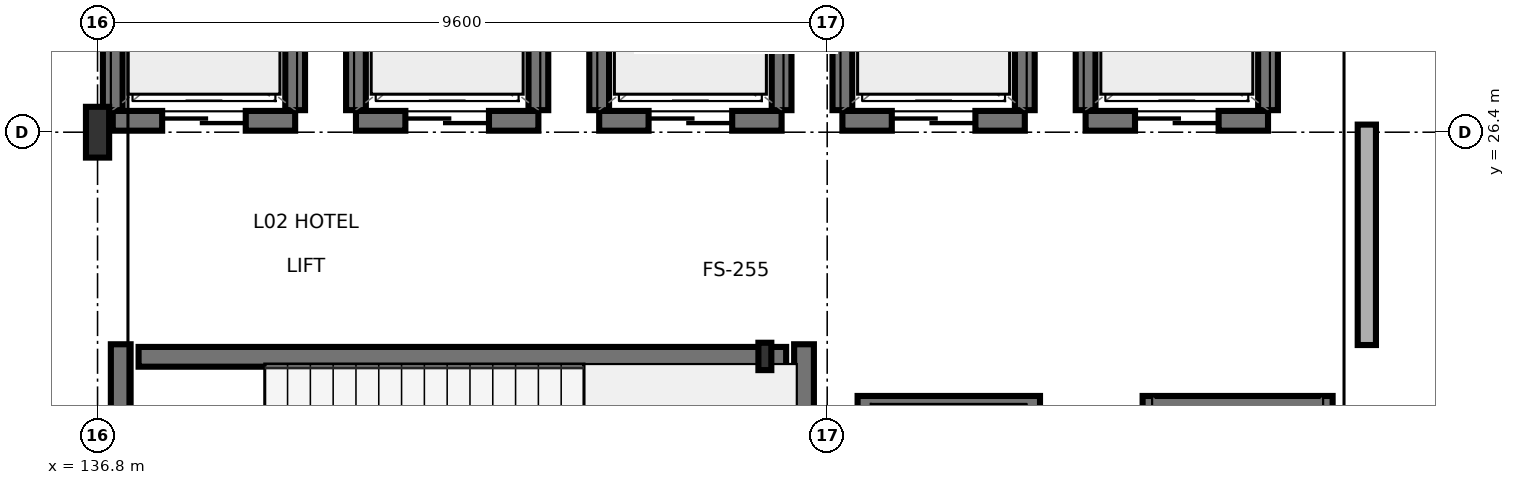
"""IFC4 building model, lengths in metres.
Left out: names, types, materials, properties, quantities, classifications, styles, units other than length and angle.
Written with IfcOpenShell. Run it as: python <this file> out.ifc"""

import sys

from ifc_helpers import new_model, si_unit, direction, frame, frame_2d, origin, origin_2d, place, context, subcontext, project, spatial, rectangle, i_section, extrude, element, fill, save


model = new_model("IFC4")
c1 = context("Model", 3, precision=1e-05, world=origin(), true_north=direction((0.0, 1.0)))
c2 = subcontext(c1, "Body", "Model", "MODEL_VIEW")
j1 = project(units=[si_unit("LENGTHUNIT", "METRE"), si_unit("PLANEANGLEUNIT", "RADIAN")], contexts=[c1])
p1 = place(None, origin())
s1 = spatial("IfcSite", under=j1, at=p1, CompositionType="ELEMENT")
p2 = place(p1, origin())
s2 = spatial("IfcBuilding", under=s1, at=p2, CompositionType="ELEMENT")
p3 = place(p2, frame((0.0, 0.0, 5.4)))
s3 = spatial("IfcBuildingStorey", under=s2, at=p3, CompositionType="ELEMENT", Elevation=5.4)
p4 = place(p3, frame((136.8, 26.4, 0.0), z_axis=(0.0, 0.0, 1.0), x_axis=(1.0, 0.0, 0.0)))
e1 = element("IfcColumn", 1, at=p4, inside=s3, PredefinedType="COLUMN", context=c2, shape_type="SweptSolid", body=[
    extrude(i_section(OverallWidth=0.305, OverallDepth=0.668, WebThickness=0.021, FlangeThickness=0.04, FilletRadius=0.027, at=origin_2d()), origin(), (0.0, 0.0, 1.0), 4.5),
])
p5 = place(p3, frame((145.58, 23.45, 0.0), z_axis=(0.0, 0.0, 1.0), x_axis=(1.0, 0.0, 0.0)))
e2 = element("IfcColumn", 2, at=p5, inside=s3, PredefinedType="PILASTER", context=c2, shape_type="SweptSolid", body=[
    extrude(i_section(OverallWidth=0.17, OverallDepth=0.36, WebThickness=0.008, FlangeThickness=0.013, FilletRadius=0.018, at=origin_2d()), origin(), (0.0, 0.0, 1.0), 4.5),
])
p6 = place(p3, frame((137.105, 19.34, 0.0), z_axis=(0.0, 0.0, 1.0), x_axis=(0.0, 1.0, 0.0)))
e3 = element("IfcWall", 3, at=p6, inside=s3, PredefinedType="SHEAR", context=c2, shape_type="SweptSolid", body=[
    extrude(rectangle(XDim=4.27, YDim=0.26, at=frame_2d((2.135, 0.0))), origin(), (0.0, 0.0, 1.0), 4.24),
])
p7 = place(p6, frame((0.61, 0.0, 0.0)))
e4 = element("IfcOpeningElement", 4, at=p7, cuts=e3, PredefinedType="OPENING", context=c2, shape_type="SweptSolid", body=[
    extrude(rectangle(XDim=1.1, YDim=2.2, at=frame_2d((0.55, 1.1))), frame((0.0, 0.14, 0.0), z_axis=(0.0, -1.0, 0.0), x_axis=(1.0, 0.0, 0.0)), (0.0, 0.0, 1.0), 0.28),
])
p8 = place(p3, frame((146.095, 19.34, 0.0), z_axis=(0.0, 0.0, 1.0), x_axis=(0.0, 1.0, 0.0)))
e5 = element("IfcWall", 5, at=p8, inside=s3, PredefinedType="SHEAR", context=c2, shape_type="SweptSolid", body=[
    extrude(rectangle(XDim=4.27, YDim=0.26, at=frame_2d((2.135, 0.0))), origin(), (0.0, 0.0, 1.0), 4.24),
])
p9 = place(p3, frame((137.34, 23.445, 0.0), z_axis=(0.0, 0.0, 1.0), x_axis=(1.0, 0.0, 0.0)))
e6 = element("IfcWall", 6, at=p9, inside=s3, PredefinedType="SHEAR", context=c2, shape_type="SweptSolid", body=[
    extrude(rectangle(XDim=8.52, YDim=0.26, at=frame_2d((4.26, 0.0))), origin(), (0.0, 0.0, 1.0), 4.24),
])
p10 = place(p3, frame((137.0, 26.55, 0.0), z_axis=(0.0, 0.0, 1.0), x_axis=(1.0, 0.0, 0.0)))
e7 = element("IfcWall", 7, at=p10, inside=s3, PredefinedType="SHEAR", context=c2, shape_type="SweptSolid", body=[
    extrude(rectangle(XDim=2.4, YDim=0.26, at=frame_2d((1.2, 0.0))), origin(), (0.0, 0.0, 1.0), 3.675),
])
p11 = place(p10, frame((0.65, 0.0, 0.0)))
e8 = element("IfcOpeningElement", 8, at=p11, cuts=e7, PredefinedType="OPENING", context=c2, shape_type="SweptSolid", body=[
    extrude(rectangle(XDim=1.1, YDim=2.2, at=frame_2d((0.55, 1.1))), frame((0.0, 0.14, 0.0), z_axis=(0.0, -1.0, 0.0), x_axis=(1.0, 0.0, 0.0)), (0.0, 0.0, 1.0), 0.28),
])
for number, where, z_axis, x_axis in (
    (9, (137.0, 26.69, 0.0), (0.0, 0.0, 1.0), (0.0, 1.0, 0.0)),
    (10, (139.4, 26.69, 0.0), (0.0, 0.0, 1.0), (0.0, 1.0, 0.0)),
):
    element("IfcWall", number, at=place(p3, frame(where, z_axis=z_axis, x_axis=x_axis)), inside=s3, PredefinedType="SHEAR", context=c2, shape_type="SweptSolid", body=[
        extrude(rectangle(XDim=1.82, YDim=0.26, at=frame_2d((0.91, 0.0))), origin(), (0.0, 0.0, 1.0), 3.675),
    ])
p12 = place(p3, frame((140.2, 26.55, 0.0), z_axis=(0.0, 0.0, 1.0), x_axis=(1.0, 0.0, 0.0)))
e11 = element("IfcWall", 11, at=p12, inside=s3, PredefinedType="SHEAR", context=c2, shape_type="SweptSolid", body=[
    extrude(rectangle(XDim=2.4, YDim=0.26, at=frame_2d((1.2, 0.0))), origin(), (0.0, 0.0, 1.0), 4.24),
])
p13 = place(p12, frame((0.65, 0.0, 0.0)))
e12 = element("IfcOpeningElement", 12, at=p13, cuts=e11, PredefinedType="OPENING", context=c2, shape_type="SweptSolid", body=[
    extrude(rectangle(XDim=1.1, YDim=2.2, at=frame_2d((0.55, 1.1))), frame((0.0, 0.14, 0.0), z_axis=(0.0, -1.0, 0.0), x_axis=(1.0, 0.0, 0.0)), (0.0, 0.0, 1.0), 0.28),
])
for number, where, z_axis, x_axis in (
    (13, (140.2, 26.69, 0.0), (0.0, 0.0, 1.0), (0.0, 1.0, 0.0)),
    (14, (142.6, 26.69, 0.0), (0.0, 0.0, 1.0), (0.0, 1.0, 0.0)),
):
    element("IfcWall", number, at=place(p3, frame(where, z_axis=z_axis, x_axis=x_axis)), inside=s3, PredefinedType="SHEAR", context=c2, shape_type="SweptSolid", body=[
        extrude(rectangle(XDim=1.82, YDim=0.26, at=frame_2d((0.91, 0.0))), origin(), (0.0, 0.0, 1.0), 4.24),
    ])
p14 = place(p3, frame((143.4, 26.55, 0.0), z_axis=(0.0, 0.0, 1.0), x_axis=(1.0, 0.0, 0.0)))
e15 = element("IfcWall", 15, at=p14, inside=s3, PredefinedType="SHEAR", context=c2, shape_type="SweptSolid", body=[
    extrude(rectangle(XDim=2.4, YDim=0.26, at=frame_2d((1.2, 0.0))), origin(), (0.0, 0.0, 1.0), 4.24),
])
p15 = place(p14, frame((0.65, 0.0, 0.0)))
e16 = element("IfcOpeningElement", 16, at=p15, cuts=e15, PredefinedType="OPENING", context=c2, shape_type="SweptSolid", body=[
    extrude(rectangle(XDim=1.1, YDim=2.2, at=frame_2d((0.55, 1.1))), frame((0.0, 0.14, 0.0), z_axis=(0.0, -1.0, 0.0), x_axis=(1.0, 0.0, 0.0)), (0.0, 0.0, 1.0), 0.28),
])
for number, where, z_axis, x_axis in (
    (17, (143.4, 26.69, 0.0), (0.0, 0.0, 1.0), (0.0, 1.0, 0.0)),
    (18, (145.8, 26.69, 0.0), (0.0, 0.0, 1.0), (0.0, 1.0, 0.0)),
):
    element("IfcWall", number, at=place(p3, frame(where, z_axis=z_axis, x_axis=x_axis)), inside=s3, PredefinedType="SHEAR", context=c2, shape_type="SweptSolid", body=[
        extrude(rectangle(XDim=1.82, YDim=0.26, at=frame_2d((0.91, 0.0))), origin(), (0.0, 0.0, 1.0), 4.24),
    ])
p16 = place(p3, frame((146.6, 26.55, 0.0), z_axis=(0.0, 0.0, 1.0), x_axis=(1.0, 0.0, 0.0)))
e19 = element("IfcWall", 19, at=p16, inside=s3, PredefinedType="SHEAR", context=c2, shape_type="SweptSolid", body=[
    extrude(rectangle(XDim=2.4, YDim=0.26, at=frame_2d((1.2, 0.0))), origin(), (0.0, 0.0, 1.0), 4.24),
])
p17 = place(p16, frame((0.65, 0.0, 0.0)))
e20 = element("IfcOpeningElement", 20, at=p17, cuts=e19, PredefinedType="OPENING", context=c2, shape_type="SweptSolid", body=[
    extrude(rectangle(XDim=1.1, YDim=2.2, at=frame_2d((0.55, 1.1))), frame((0.0, 0.14, 0.0), z_axis=(0.0, -1.0, 0.0), x_axis=(1.0, 0.0, 0.0)), (0.0, 0.0, 1.0), 0.28),
])
for number, where, z_axis, x_axis in (
    (21, (146.6, 26.69, 0.0), (0.0, 0.0, 1.0), (0.0, 1.0, 0.0)),
    (22, (149.0, 26.69, 0.0), (0.0, 0.0, 1.0), (0.0, 1.0, 0.0)),
):
    element("IfcWall", number, at=place(p3, frame(where, z_axis=z_axis, x_axis=x_axis)), inside=s3, PredefinedType="SHEAR", context=c2, shape_type="SweptSolid", body=[
        extrude(rectangle(XDim=1.82, YDim=0.26, at=frame_2d((0.91, 0.0))), origin(), (0.0, 0.0, 1.0), 4.24),
    ])
p18 = place(p3, frame((149.8, 26.55, 0.0), z_axis=(0.0, 0.0, 1.0), x_axis=(1.0, 0.0, 0.0)))
e23 = element("IfcWall", 23, at=p18, inside=s3, PredefinedType="SHEAR", context=c2, shape_type="SweptSolid", body=[
    extrude(rectangle(XDim=2.4, YDim=0.26, at=frame_2d((1.2, 0.0))), origin(), (0.0, 0.0, 1.0), 4.24),
])
p19 = place(p18, frame((0.65, 0.0, 0.0)))
e24 = element("IfcOpeningElement", 24, at=p19, cuts=e23, PredefinedType="OPENING", context=c2, shape_type="SweptSolid", body=[
    extrude(rectangle(XDim=1.1, YDim=2.2, at=frame_2d((0.55, 1.1))), frame((0.0, 0.14, 0.0), z_axis=(0.0, -1.0, 0.0), x_axis=(1.0, 0.0, 0.0)), (0.0, 0.0, 1.0), 0.28),
])
for number, where, z_axis, x_axis in (
    (25, (149.8, 26.69, 0.0), (0.0, 0.0, 1.0), (0.0, 1.0, 0.0)),
    (26, (152.2, 26.69, 0.0), (0.0, 0.0, 1.0), (0.0, 1.0, 0.0)),
):
    element("IfcWall", number, at=place(p3, frame(where, z_axis=z_axis, x_axis=x_axis)), inside=s3, PredefinedType="SHEAR", context=c2, shape_type="SweptSolid", body=[
        extrude(rectangle(XDim=1.82, YDim=0.26, at=frame_2d((0.91, 0.0))), origin(), (0.0, 0.0, 1.0), 4.24),
    ])
p20 = place(p3, frame((146.8, 22.8, 0.0), z_axis=(0.0, 0.0, 1.0), x_axis=(1.0, 0.0, 0.0)))
e27 = element("IfcWall", 27, at=p20, inside=s3, PredefinedType="SHEAR", context=c2, shape_type="SweptSolid", body=[
    extrude(rectangle(XDim=2.4, YDim=0.26, at=frame_2d((1.2, 0.0))), origin(), (0.0, 0.0, 1.0), 4.24),
])
p21 = place(p3, frame((150.55, 22.8, 0.0), z_axis=(0.0, 0.0, 1.0), x_axis=(1.0, 0.0, 0.0)))
e28 = element("IfcWall", 28, at=p21, inside=s3, PredefinedType="SHEAR", context=c2, shape_type="SweptSolid", body=[
    extrude(rectangle(XDim=2.5, YDim=0.26, at=frame_2d((1.25, 0.0))), origin(), (0.0, 0.0, 1.0), 4.24),
])
p22 = place(p3, frame((153.5, 23.6, 0.0), z_axis=(0.0, 0.0, 1.0), x_axis=(0.0, 1.0, 0.0)))
e29 = element("IfcWall", 29, at=p22, inside=s3, PredefinedType="SOLIDWALL", context=c2, shape_type="SweptSolid", body=[
    extrude(rectangle(XDim=2.9, YDim=0.24, at=frame_2d((1.45, 0.0))), origin(), (0.0, 0.0, 1.0), 4.24),
])
p23 = place(p11, origin())
e30 = element("IfcDoor", 30, at=p23, inside=s3, OperationType="SLIDING_TO_LEFT", PredefinedType="DOOR", context=c2, shape_type="SweptSolid", body=[
    extrude(rectangle(XDim=1.1, YDim=2.2, at=frame_2d((0.55, 1.1))), frame((0.0, 0.025, 0.0), z_axis=(0.0, -1.0, 0.0), x_axis=(1.0, 0.0, 0.0)), (0.0, 0.0, 1.0), 0.05),
])
fill(e8, e30)
p24 = place(p13, origin())
e31 = element("IfcDoor", 31, at=p24, inside=s3, OperationType="SLIDING_TO_RIGHT", PredefinedType="DOOR", context=c2, shape_type="SweptSolid", body=[
    extrude(rectangle(XDim=1.1, YDim=2.2, at=frame_2d((0.55, 1.1))), frame((0.0, 0.025, 0.0), z_axis=(0.0, -1.0, 0.0), x_axis=(1.0, 0.0, 0.0)), (0.0, 0.0, 1.0), 0.05),
])
fill(e12, e31)
p25 = place(p15, origin())
e32 = element("IfcDoor", 32, at=p25, inside=s3, OperationType="SLIDING_TO_LEFT", PredefinedType="DOOR", context=c2, shape_type="SweptSolid", body=[
    extrude(rectangle(XDim=1.1, YDim=2.2, at=frame_2d((0.55, 1.1))), frame((0.0, 0.025, 0.0), z_axis=(0.0, -1.0, 0.0), x_axis=(1.0, 0.0, 0.0)), (0.0, 0.0, 1.0), 0.05),
])
fill(e16, e32)
p26 = place(p17, origin())
e33 = element("IfcDoor", 33, at=p26, inside=s3, OperationType="SLIDING_TO_RIGHT", PredefinedType="DOOR", context=c2, shape_type="SweptSolid", body=[
    extrude(rectangle(XDim=1.1, YDim=2.2, at=frame_2d((0.55, 1.1))), frame((0.0, 0.025, 0.0), z_axis=(0.0, -1.0, 0.0), x_axis=(1.0, 0.0, 0.0)), (0.0, 0.0, 1.0), 0.05),
])
fill(e20, e33)
p27 = place(p19, origin())
e34 = element("IfcDoor", 34, at=p27, inside=s3, OperationType="SLIDING_TO_LEFT", PredefinedType="DOOR", context=c2, shape_type="SweptSolid", body=[
    extrude(rectangle(XDim=1.1, YDim=2.2, at=frame_2d((0.55, 1.1))), frame((0.0, 0.025, 0.0), z_axis=(0.0, -1.0, 0.0), x_axis=(1.0, 0.0, 0.0)), (0.0, 0.0, 1.0), 0.05),
])
fill(e24, e34)
save(model, sys.argv[1])
